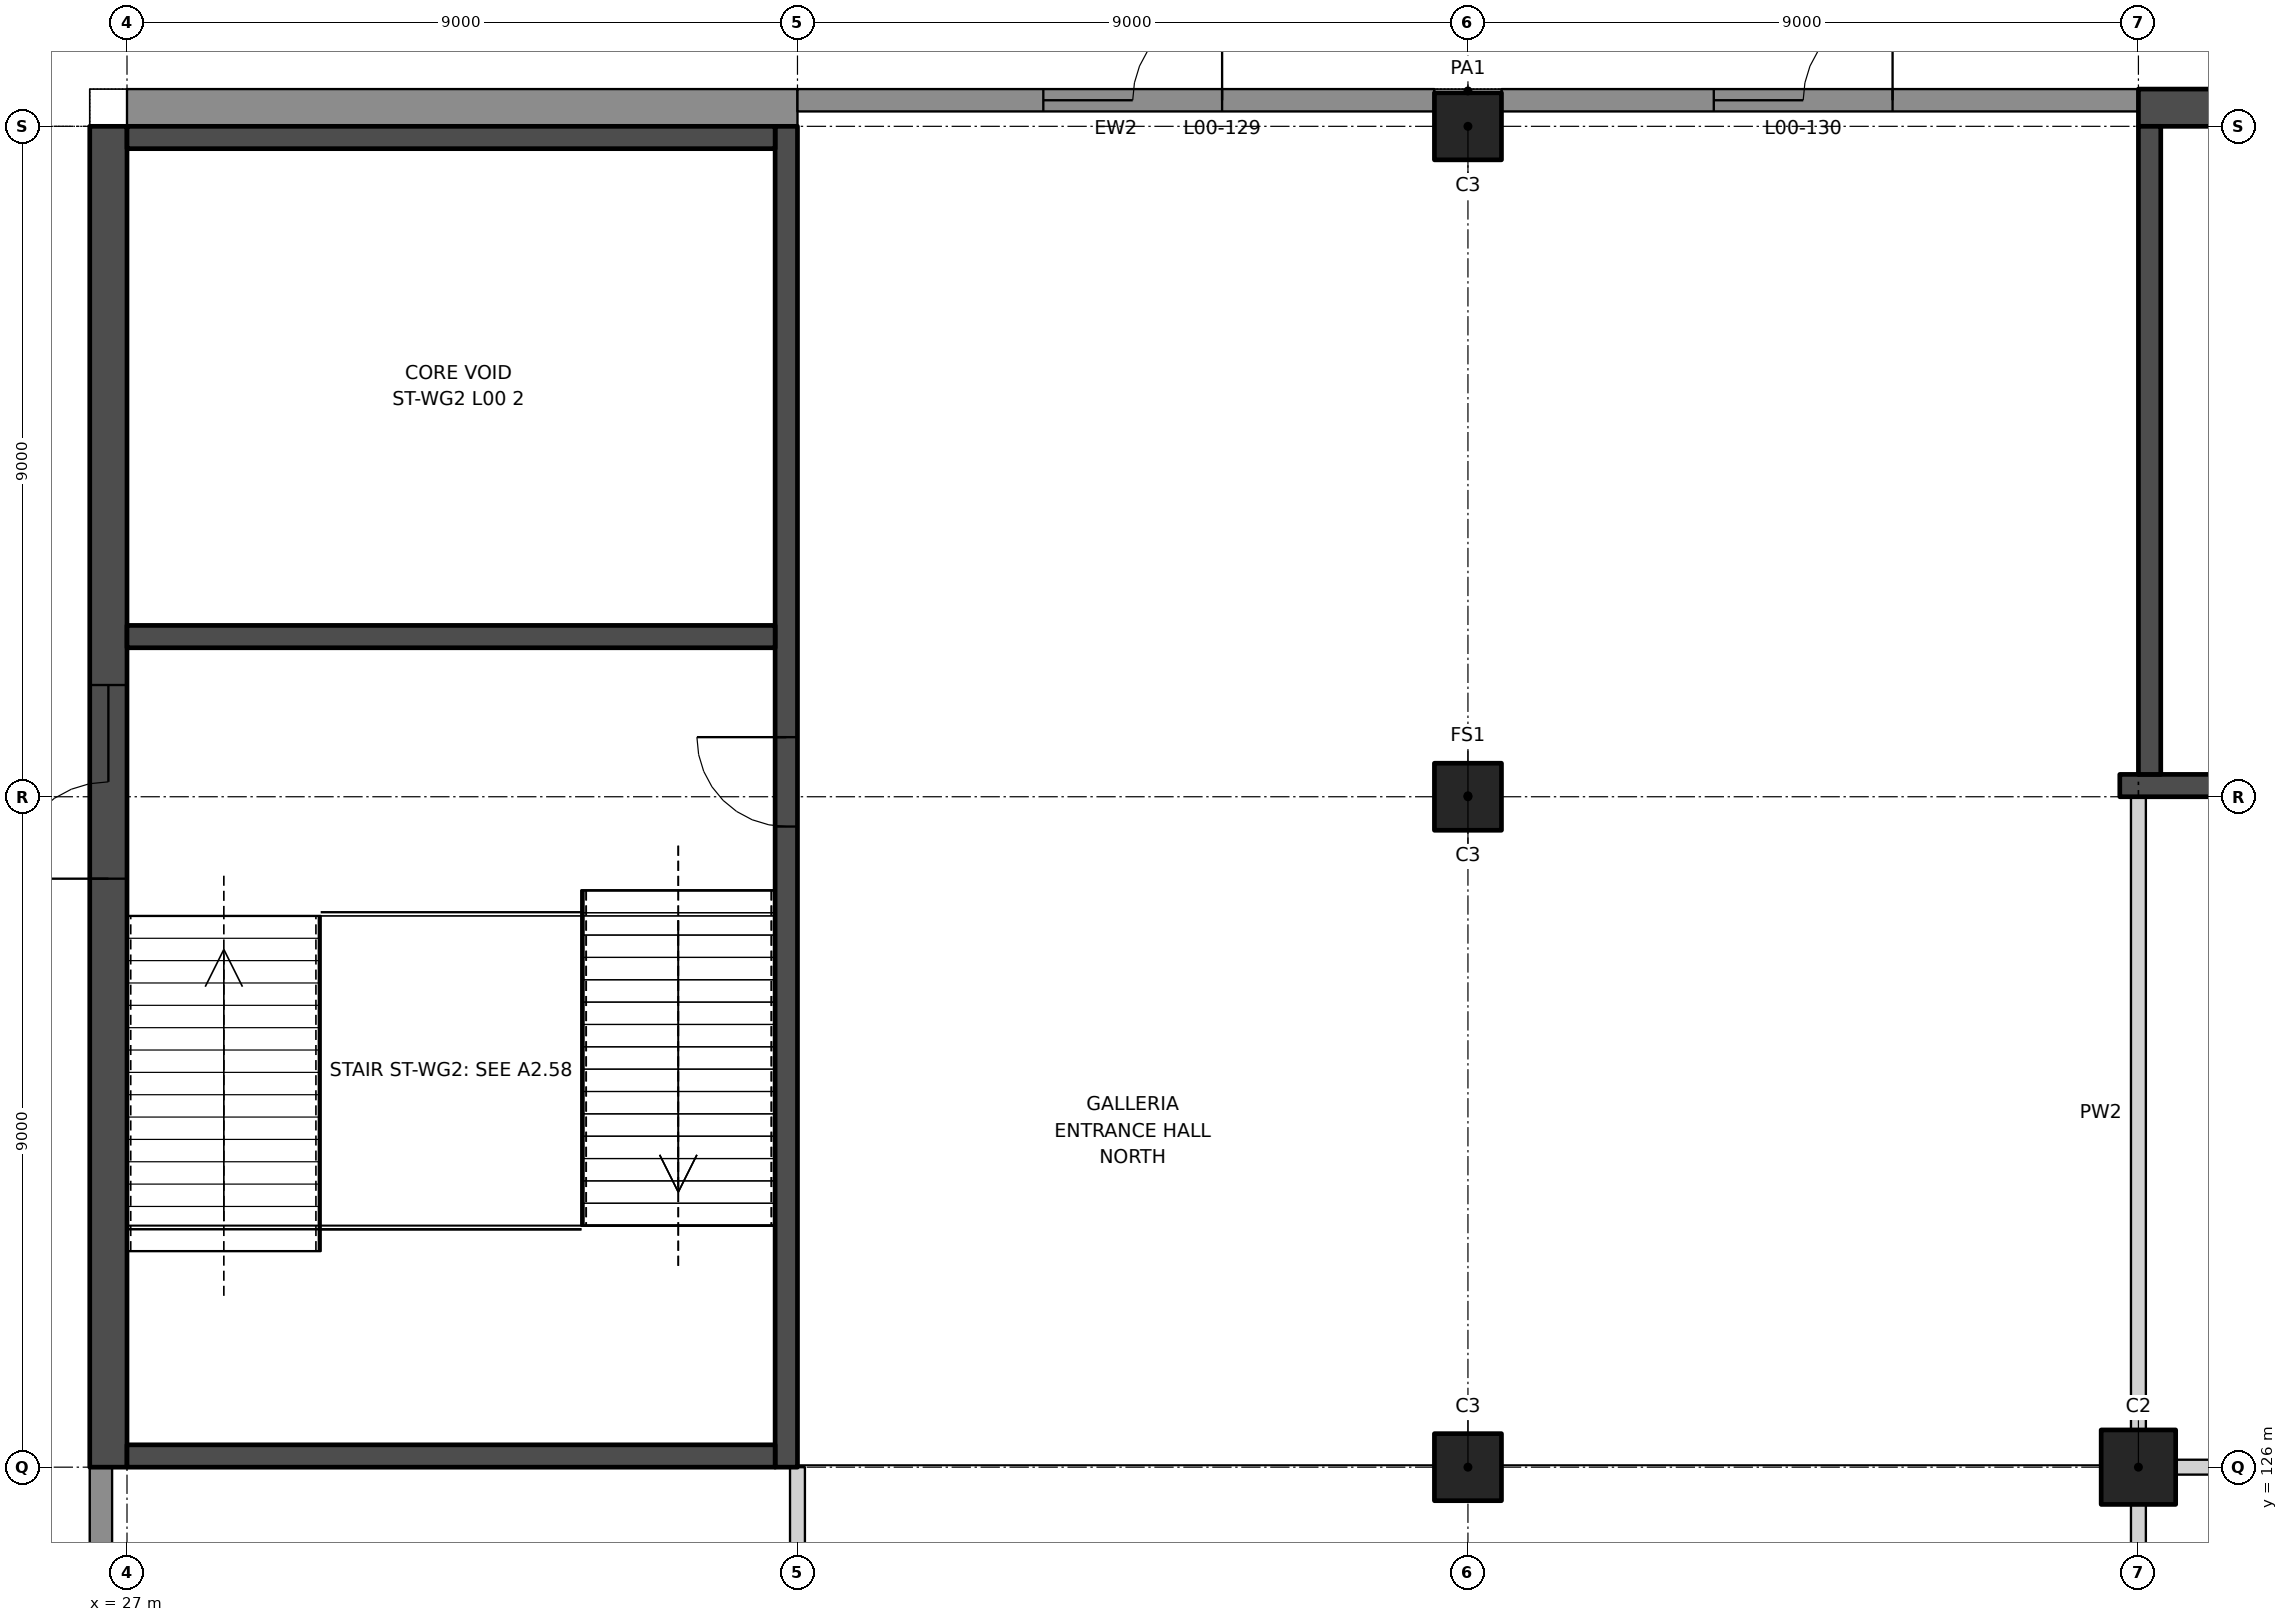
"""IFC4 building model, lengths in metres.
Left out: names, types, materials, properties, quantities, classifications, styles, units other than length and angle.
Written with IfcOpenShell. Run it as: python <this file> out.ifc"""

import sys

from ifc_helpers import new_model, si_unit, direction, frame, frame_2d, origin, origin_2d, place, context, subcontext, project, spatial, rectangle, extrude, element, fill, save


model = new_model("IFC4")
c1 = context("Model", 3, precision=1e-05, world=origin(), true_north=direction((0.0, 1.0)))
c2 = subcontext(c1, "Body", "Model", "MODEL_VIEW")
j1 = project(units=[si_unit("LENGTHUNIT", "METRE"), si_unit("PLANEANGLEUNIT", "RADIAN")], contexts=[c1])
p1 = place(None, origin())
s1 = spatial("IfcSite", under=j1, at=p1, CompositionType="ELEMENT")
p2 = place(p1, origin())
s2 = spatial("IfcBuilding", under=s1, at=p2, CompositionType="ELEMENT")
p3 = place(p2, origin())
s3 = spatial("IfcBuildingStorey", under=s2, at=p3, CompositionType="ELEMENT", Elevation=0.0)
p4 = place(p3, frame((54.0, 126.0, 0.0), z_axis=(0.0, 0.0, 1.0), x_axis=(1.0, 0.0, 0.0)))
e1 = element("IfcColumn", 1, at=p4, inside=s3, PredefinedType="COLUMN", context=c2, shape_type="SweptSolid", body=[
    extrude(rectangle(XDim=1.0, YDim=1.0, at=origin_2d()), origin(), (0.0, 0.0, 1.0), 7.0),
])
for number, where, z_axis, x_axis in (
    (2, (45.0, 126.0, 0.0), (0.0, 0.0, 1.0), (1.0, 0.0, 0.0)),
    (3, (45.0, 135.0, 0.0), (0.0, 0.0, 1.0), (1.0, 0.0, 0.0)),
    (4, (45.0, 144.0, 0.0), (0.0, 0.0, 1.0), (1.0, 0.0, 0.0)),
):
    element("IfcColumn", number, at=place(p3, frame(where, z_axis=z_axis, x_axis=x_axis)), inside=s3, PredefinedType="COLUMN", context=c2, shape_type="SweptSolid", body=[
        extrude(rectangle(XDim=0.9, YDim=0.9, at=origin_2d()), origin(), (0.0, 0.0, 1.0), 7.0),
    ])
p5 = place(p3, frame((54.5, 126.0, 0.0), z_axis=(0.0, 0.0, 1.0), x_axis=(1.0, 0.0, 0.0)))
e5 = element("IfcWall", 5, at=p5, inside=s3, PredefinedType="PARTITIONING", context=c2, shape_type="SweptSolid", body=[
    extrude(rectangle(XDim=8.05, YDim=0.2, at=frame_2d((4.025, 0.0))), origin(), (0.0, 0.0, 1.0), 5.75),
])
p6 = place(p3, frame((36.0, 117.45, 0.0), z_axis=(0.0, 0.0, 1.0), x_axis=(0.0, 1.0, 0.0)))
e6 = element("IfcWall", 6, at=p6, inside=s3, PredefinedType="PARTITIONING", context=c2, shape_type="SweptSolid", body=[
    extrude(rectangle(XDim=8.55, YDim=0.2, at=frame_2d((4.275, 0.0))), origin(), (0.0, 0.0, 1.0), 5.75),
])
p7 = place(p6, frame((3.775, 0.0, 0.0)))
e7 = element("IfcOpeningElement", 7, at=p7, cuts=e6, PredefinedType="OPENING", context=c2, shape_type="SweptSolid", body=[
    extrude(rectangle(XDim=1.0, YDim=2.1, at=frame_2d((0.5, 1.05))), frame((0.0, 0.11, 0.0), z_axis=(0.0, -1.0, 0.0), x_axis=(1.0, 0.0, 0.0)), (0.0, 0.0, 1.0), 0.22),
])
p8 = place(p3, frame((54.0, 117.5, 0.0), z_axis=(0.0, 0.0, 1.0), x_axis=(0.0, 1.0, 0.0)))
e8 = element("IfcWall", 8, at=p8, inside=s3, PredefinedType="PARTITIONING", context=c2, shape_type="SweptSolid", body=[
    extrude(rectangle(XDim=8.0, YDim=0.2, at=frame_2d((4.0, 0.0))), origin(), (0.0, 0.0, 1.0), 5.75),
])
p9 = place(p3, frame((54.0, 126.5, 0.0), z_axis=(0.0, 0.0, 1.0), x_axis=(0.0, 1.0, 0.0)))
e9 = element("IfcWall", 9, at=p9, inside=s3, PredefinedType="PARTITIONING", context=c2, shape_type="SweptSolid", body=[
    extrude(rectangle(XDim=8.5, YDim=0.2, at=frame_2d((4.25, 0.0))), origin(), (0.0, 0.0, 1.0), 5.75),
])
p10 = place(p3, frame((36.0, 144.25, 0.0), z_axis=(0.0, 0.0, 1.0), x_axis=(-1.0, 0.0, 0.0)))
e10 = element("IfcWall", 10, at=p10, inside=s3, PredefinedType="SOLIDWALL", context=c2, shape_type="SweptSolid", body=[
    extrude(rectangle(XDim=9.0, YDim=0.5, at=frame_2d((4.5, 0.0))), origin(), (0.0, 0.0, 1.0), 7.0),
])
p11 = place(p3, frame((44.55, 144.35, 0.0), z_axis=(0.0, 0.0, 1.0), x_axis=(-1.0, 0.0, 0.0)))
e11 = element("IfcWall", 11, at=p11, inside=s3, PredefinedType="SOLIDWALL", context=c2, shape_type="SweptSolid", body=[
    extrude(rectangle(XDim=8.55, YDim=0.3, at=frame_2d((4.275, 0.0))), origin(), (0.0, 0.0, 1.0), 7.0),
])
p12 = place(p11, frame((2.85, 0.0, 0.0)))
e12 = element("IfcOpeningElement", 12, at=p12, cuts=e11, PredefinedType="OPENING", context=c2, shape_type="SweptSolid", body=[
    extrude(rectangle(XDim=2.4, YDim=2.4, at=frame_2d((1.2, 1.2))), frame((0.0, 0.16, 0.0), z_axis=(0.0, -1.0, 0.0), x_axis=(1.0, 0.0, 0.0)), (0.0, 0.0, 1.0), 0.32),
])
p13 = place(p3, frame((54.0, 144.35, 0.0), z_axis=(0.0, 0.0, 1.0), x_axis=(-1.0, 0.0, 0.0)))
e13 = element("IfcWall", 13, at=p13, inside=s3, PredefinedType="SOLIDWALL", context=c2, shape_type="SweptSolid", body=[
    extrude(rectangle(XDim=8.55, YDim=0.3, at=frame_2d((4.275, 0.0))), origin(), (0.0, 0.0, 1.0), 7.0),
])
p14 = place(p13, frame((3.3, 0.0, 0.0)))
e14 = element("IfcOpeningElement", 14, at=p14, cuts=e13, PredefinedType="OPENING", context=c2, shape_type="SweptSolid", body=[
    extrude(rectangle(XDim=2.4, YDim=2.4, at=frame_2d((1.2, 1.2))), frame((0.0, 0.16, 0.0), z_axis=(0.0, -1.0, 0.0), x_axis=(1.0, 0.0, 0.0)), (0.0, 0.0, 1.0), 0.32),
])
p15 = place(p3, frame((26.65, 126.0, 0.0), z_axis=(0.0, 0.0, 1.0), x_axis=(0.0, -1.0, 0.0)))
e15 = element("IfcWall", 15, at=p15, inside=s3, PredefinedType="SOLIDWALL", context=c2, shape_type="SweptSolid", body=[
    extrude(rectangle(XDim=8.55, YDim=0.3, at=frame_2d((4.275, 0.0))), origin(), (0.0, 0.0, 1.0), 7.0),
])
p16 = place(p15, frame((5.3, 0.0, 0.0)))
e16 = element("IfcOpeningElement", 16, at=p16, cuts=e15, PredefinedType="OPENING", context=c2, shape_type="SweptSolid", body=[
    extrude(rectangle(XDim=2.4, YDim=2.4, at=frame_2d((1.2, 1.2))), frame((0.0, 0.16, 0.0), z_axis=(0.0, -1.0, 0.0), x_axis=(1.0, 0.0, 0.0)), (0.0, 0.0, 1.0), 0.32),
])
p17 = place(p15, frame((1.3, 0.0, 0.0)))
e17 = element("IfcOpeningElement", 17, at=p17, cuts=e15, PredefinedType="OPENING", context=c2, shape_type="SweptSolid", body=[
    extrude(rectangle(XDim=2.4, YDim=2.4, at=frame_2d((1.2, 1.2))), frame((0.0, 0.16, 0.0), z_axis=(0.0, -1.0, 0.0), x_axis=(1.0, 0.0, 0.0)), (0.0, 0.0, 1.0), 0.32),
])
p18 = place(p3, frame((72.0, 135.15, 0.0), z_axis=(0.0, 0.0, 1.0), x_axis=(-1.0, 0.0, 0.0)))
e18 = element("IfcWall", 18, at=p18, inside=s3, PredefinedType="SHEAR", context=c2, shape_type="SweptSolid", body=[
    extrude(rectangle(XDim=18.25, YDim=0.3, at=frame_2d((9.125, 0.0))), origin(), (0.0, 0.0, 1.0), 7.0),
])
p19 = place(p18, frame((1.5, 0.0, 0.0)))
e19 = element("IfcOpeningElement", 19, at=p19, cuts=e18, PredefinedType="OPENING", context=c2, shape_type="SweptSolid", body=[
    extrude(rectangle(XDim=1.2, YDim=2.1, at=frame_2d((0.6, 1.05))), frame((0.0, 0.16, 0.0), z_axis=(0.0, -1.0, 0.0), x_axis=(1.0, 0.0, 0.0)), (0.0, 0.0, 1.0), 0.32),
])
p20 = place(p3, frame((72.0, 144.25, 0.0), z_axis=(0.0, 0.0, 1.0), x_axis=(-1.0, 0.0, 0.0)))
e20 = element("IfcWall", 20, at=p20, inside=s3, PredefinedType="SHEAR", context=c2, shape_type="SweptSolid", body=[
    extrude(rectangle(XDim=18.0, YDim=0.5, at=frame_2d((9.0, 0.0))), origin(), (0.0, 0.0, 1.0), 7.0),
])
p21 = place(p20, frame((0.8, 0.0, 0.0)))
e21 = element("IfcOpeningElement", 21, at=p21, cuts=e20, PredefinedType="OPENING", context=c2, shape_type="SweptSolid", body=[
    extrude(rectangle(XDim=2.6, YDim=2.4, at=frame_2d((1.3, 1.2))), frame((0.0, 0.26, 0.0), z_axis=(0.0, -1.0, 0.0), x_axis=(1.0, 0.0, 0.0)), (0.0, 0.0, 1.0), 0.52),
])
p22 = place(p3, frame((54.15, 135.3, 0.0), z_axis=(0.0, 0.0, 1.0), x_axis=(0.0, 1.0, 0.0)))
e22 = element("IfcWall", 22, at=p22, inside=s3, PredefinedType="SHEAR", context=c2, shape_type="SweptSolid", body=[
    extrude(rectangle(XDim=8.7, YDim=0.3, at=frame_2d((4.35, 0.0))), origin(), (0.0, 0.0, 1.0), 7.0),
])
p23 = place(p3, frame((35.85, 126.0, 0.0), z_axis=(0.0, 0.0, 1.0), x_axis=(0.0, 1.0, 0.0)))
e23 = element("IfcWall", 23, at=p23, inside=s3, PredefinedType="SHEAR", context=c2, shape_type="SweptSolid", body=[
    extrude(rectangle(XDim=18.0, YDim=0.3, at=frame_2d((9.0, 0.0))), origin(), (0.0, 0.0, 1.0), 7.0),
])
p24 = place(p23, frame((8.6, 0.0, 0.0)))
e24 = element("IfcOpeningElement", 24, at=p24, cuts=e23, PredefinedType="OPENING", context=c2, shape_type="SweptSolid", body=[
    extrude(rectangle(XDim=1.2, YDim=2.1, at=frame_2d((0.6, 1.05))), frame((0.0, 0.16, 0.0), z_axis=(0.0, -1.0, 0.0), x_axis=(1.0, 0.0, 0.0)), (0.0, 0.0, 1.0), 0.32),
])
p25 = place(p3, frame((26.75, 126.0, 0.0), z_axis=(0.0, 0.0, 1.0), x_axis=(0.0, 1.0, 0.0)))
e25 = element("IfcWall", 25, at=p25, inside=s3, PredefinedType="SHEAR", context=c2, shape_type="SweptSolid", body=[
    extrude(rectangle(XDim=18.0, YDim=0.5, at=frame_2d((9.0, 0.0))), origin(), (0.0, 0.0, 1.0), 7.0),
])
p26 = place(p25, frame((7.9, 0.0, 0.0)))
e26 = element("IfcOpeningElement", 26, at=p26, cuts=e25, PredefinedType="OPENING", context=c2, shape_type="SweptSolid", body=[
    extrude(rectangle(XDim=2.6, YDim=2.4, at=frame_2d((1.3, 1.2))), frame((0.0, 0.26, 0.0), z_axis=(0.0, -1.0, 0.0), x_axis=(1.0, 0.0, 0.0)), (0.0, 0.0, 1.0), 0.52),
])
for number, where, z_axis, x_axis in (
    (27, (35.7, 126.15, 0.0), (0.0, 0.0, 1.0), (-1.0, 0.0, 0.0)),
    (28, (35.7, 143.85, 0.0), (0.0, 0.0, 1.0), (-1.0, 0.0, 0.0)),
    (29, (35.7, 137.15, 0.0), (0.0, 0.0, 1.0), (-1.0, 0.0, 0.0)),
):
    element("IfcWall", number, at=place(p3, frame(where, z_axis=z_axis, x_axis=x_axis)), inside=s3, PredefinedType="SHEAR", context=c2, shape_type="SweptSolid", body=[
        extrude(rectangle(XDim=8.7, YDim=0.3, at=frame_2d((4.35, 0.0))), origin(), (0.0, 0.0, 1.0), 7.0),
    ])
p27 = place(p12, frame((2.4, 0.0, 0.0), z_axis=(0.0, 0.0, 1.0), x_axis=(-1.0, 0.0, 0.0)))
e30 = element("IfcDoor", 30, at=p27, inside=s3, OperationType="DOUBLE_DOOR_SINGLE_SWING", PredefinedType="DOOR", context=c2, shape_type="SweptSolid", body=[
    extrude(rectangle(XDim=2.4, YDim=2.4, at=frame_2d((1.2, 1.2))), frame((0.0, 0.025, 0.0), z_axis=(0.0, -1.0, 0.0), x_axis=(1.0, 0.0, 0.0)), (0.0, 0.0, 1.0), 0.05),
])
fill(e12, e30)
p28 = place(p14, frame((2.4, 0.0, 0.0), z_axis=(0.0, 0.0, 1.0), x_axis=(-1.0, 0.0, 0.0)))
e31 = element("IfcDoor", 31, at=p28, inside=s3, OperationType="DOUBLE_DOOR_SINGLE_SWING", PredefinedType="DOOR", context=c2, shape_type="SweptSolid", body=[
    extrude(rectangle(XDim=2.4, YDim=2.4, at=frame_2d((1.2, 1.2))), frame((0.0, 0.025, 0.0), z_axis=(0.0, -1.0, 0.0), x_axis=(1.0, 0.0, 0.0)), (0.0, 0.0, 1.0), 0.05),
])
fill(e14, e31)
p29 = place(p24, origin())
e32 = element("IfcDoor", 32, at=p29, inside=s3, OperationType="SINGLE_SWING_RIGHT", PredefinedType="DOOR", context=c2, shape_type="SweptSolid", body=[
    extrude(rectangle(XDim=1.2, YDim=2.1, at=frame_2d((0.6, 1.05))), frame((0.0, 0.025, 0.0), z_axis=(0.0, -1.0, 0.0), x_axis=(1.0, 0.0, 0.0)), (0.0, 0.0, 1.0), 0.05),
])
fill(e24, e32)
p30 = place(p26, origin())
e33 = element("IfcDoor", 33, at=p30, inside=s3, OperationType="DOUBLE_DOOR_SINGLE_SWING", PredefinedType="DOOR", context=c2, shape_type="SweptSolid", body=[
    extrude(rectangle(XDim=2.6, YDim=2.4, at=frame_2d((1.3, 1.2))), frame((0.0, 0.025, 0.0), z_axis=(0.0, -1.0, 0.0), x_axis=(1.0, 0.0, 0.0)), (0.0, 0.0, 1.0), 0.05),
])
fill(e26, e33)
save(model, sys.argv[1])
